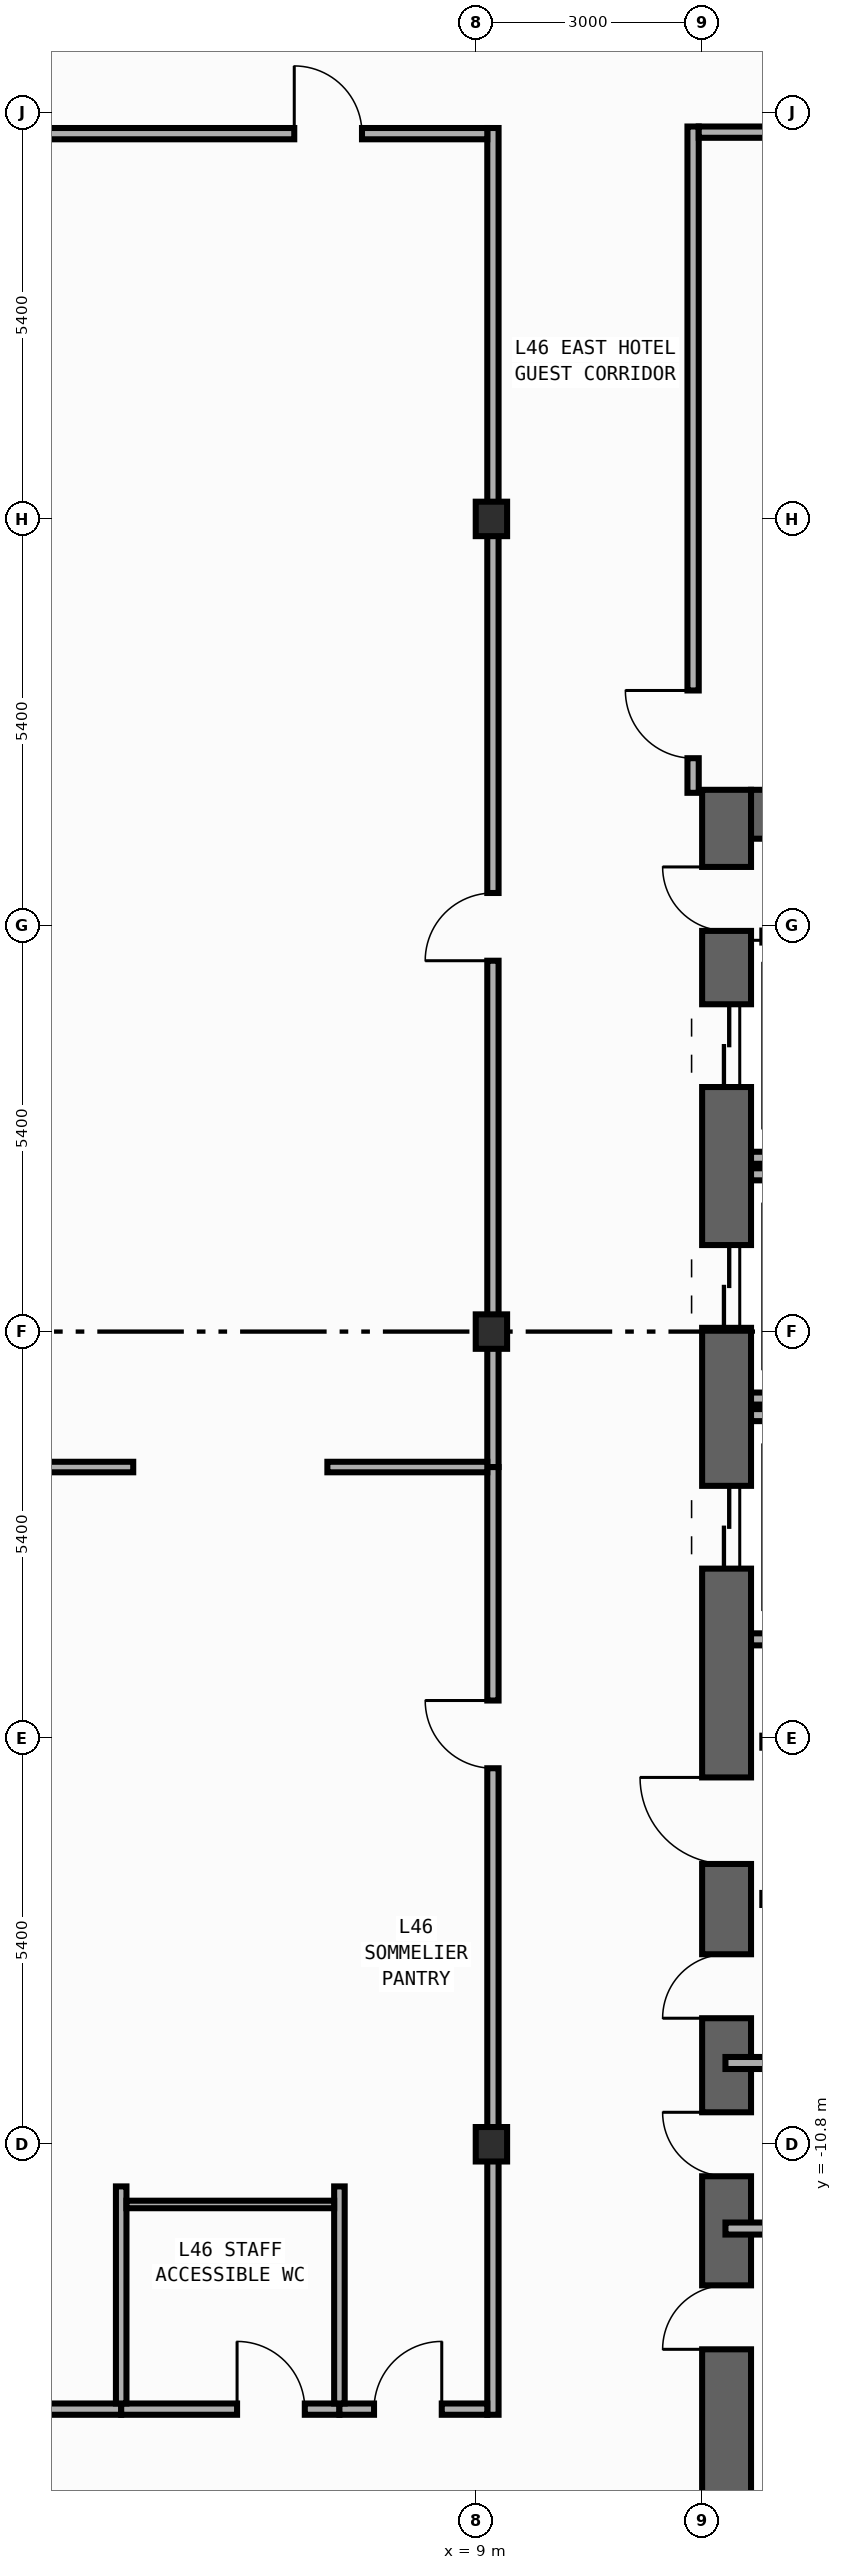
"""IFC4 building model, lengths in metres.
Left out: names, types, materials, properties, quantities, classifications, styles, units other than length and angle.
Written with IfcOpenShell. Run it as: python <this file> out.ifc"""

import sys

from ifc_helpers import new_model, si_unit, direction, frame, frame_2d, origin, origin_2d, place, context, subcontext, project, spatial, rectangle, i_section, extrude, element, fill, save


model = new_model("IFC4")
c1 = context("Model", 3, precision=1e-05, world=origin(), true_north=direction((0.0, 1.0)))
c2 = subcontext(c1, "Body", "Model", "MODEL_VIEW")
j1 = project(units=[si_unit("LENGTHUNIT", "METRE"), si_unit("PLANEANGLEUNIT", "RADIAN")], contexts=[c1])
p1 = place(None, origin())
s1 = spatial("IfcSite", under=j1, at=p1, CompositionType="ELEMENT")
p2 = place(p1, origin())
s2 = spatial("IfcBuilding", under=s1, at=p2, CompositionType="ELEMENT")
p3 = place(p2, frame((0.0, 0.0, 199.2)))
s3 = spatial("IfcBuildingStorey", under=s2, at=p3, CompositionType="ELEMENT", Elevation=199.2)
p4 = place(p3, frame((12.325, -19.8, 0.0), z_axis=(0.0, 0.0, 1.0), x_axis=(0.0, 1.0, 0.0)))
e1 = element("IfcWall", 1, at=p4, inside=s3, PredefinedType="SHEAR", context=c2, shape_type="SweptSolid", body=[
    extrude(rectangle(XDim=27.0, YDim=0.65, at=frame_2d((13.5, 0.0))), origin(), (0.0, 0.0, 1.0), 3.54),
])
p5 = place(p4, frame((23.05, 0.0, 0.0)))
e2 = element("IfcOpeningElement", 2, at=p5, cuts=e1, PredefinedType="OPENING", context=c2, shape_type="SweptSolid", body=[
    extrude(rectangle(XDim=1.1, YDim=2.2, at=frame_2d((0.55, 1.1))), frame((0.0, 0.335, 0.0), z_axis=(0.0, -1.0, 0.0), x_axis=(1.0, 0.0, 0.0)), (0.0, 0.0, 1.0), 0.67),
])
p6 = place(p4, frame((19.85, 0.0, 0.0)))
e3 = element("IfcOpeningElement", 3, at=p6, cuts=e1, PredefinedType="OPENING", context=c2, shape_type="SweptSolid", body=[
    extrude(rectangle(XDim=1.1, YDim=2.2, at=frame_2d((0.55, 1.1))), frame((0.0, 0.335, 0.0), z_axis=(0.0, -1.0, 0.0), x_axis=(1.0, 0.0, 0.0)), (0.0, 0.0, 1.0), 0.67),
])
p7 = place(p4, frame((16.65, 0.0, 0.0)))
e4 = element("IfcOpeningElement", 4, at=p7, cuts=e1, PredefinedType="OPENING", context=c2, shape_type="SweptSolid", body=[
    extrude(rectangle(XDim=1.1, YDim=2.2, at=frame_2d((0.55, 1.1))), frame((0.0, 0.335, 0.0), z_axis=(0.0, -1.0, 0.0), x_axis=(1.0, 0.0, 0.0)), (0.0, 0.0, 1.0), 0.67),
])
p8 = place(p4, frame((6.275, 0.0, 0.0)))
e5 = element("IfcOpeningElement", 5, at=p8, cuts=e1, PredefinedType="OPENING", context=c2, shape_type="SweptSolid", body=[
    extrude(rectangle(XDim=0.85, YDim=2.1, at=frame_2d((0.425, 1.05))), frame((0.0, 0.335, 0.0), z_axis=(0.0, -1.0, 0.0), x_axis=(1.0, 0.0, 0.0)), (0.0, 0.0, 1.0), 0.67),
])
p9 = place(p4, frame((8.575, 0.0, 0.0)))
e6 = element("IfcOpeningElement", 6, at=p9, cuts=e1, PredefinedType="OPENING", context=c2, shape_type="SweptSolid", body=[
    extrude(rectangle(XDim=0.85, YDim=2.1, at=frame_2d((0.425, 1.05))), frame((0.0, 0.335, 0.0), z_axis=(0.0, -1.0, 0.0), x_axis=(1.0, 0.0, 0.0)), (0.0, 0.0, 1.0), 0.67),
])
p10 = place(p4, frame((10.675, 0.0, 0.0)))
e7 = element("IfcOpeningElement", 7, at=p10, cuts=e1, PredefinedType="OPENING", context=c2, shape_type="SweptSolid", body=[
    extrude(rectangle(XDim=0.85, YDim=2.1, at=frame_2d((0.425, 1.05))), frame((0.0, 0.335, 0.0), z_axis=(0.0, -1.0, 0.0), x_axis=(1.0, 0.0, 0.0)), (0.0, 0.0, 1.0), 0.67),
])
p11 = place(p4, frame((12.725, 0.0, 0.0)))
e8 = element("IfcOpeningElement", 8, at=p11, cuts=e1, PredefinedType="OPENING", context=c2, shape_type="SweptSolid", body=[
    extrude(rectangle(XDim=1.15, YDim=2.2, at=frame_2d((0.575, 1.1))), frame((0.0, 0.335, 0.0), z_axis=(0.0, -1.0, 0.0), x_axis=(1.0, 0.0, 0.0)), (0.0, 0.0, 1.0), 0.67),
])
p12 = place(p4, frame((25.125, 0.0, 0.0)))
e9 = element("IfcOpeningElement", 9, at=p12, cuts=e1, PredefinedType="OPENING", context=c2, shape_type="SweptSolid", body=[
    extrude(rectangle(XDim=0.85, YDim=2.1, at=frame_2d((0.425, 1.05))), frame((0.0, 0.335, 0.0), z_axis=(0.0, -1.0, 0.0), x_axis=(1.0, 0.0, 0.0)), (0.0, 0.0, 1.0), 0.67),
])
p13 = place(p3, frame((12.65, 6.875, 0.0), z_axis=(0.0, 0.0, 1.0), x_axis=(1.0, 0.0, 0.0)))
e10 = element("IfcWall", 10, at=p13, inside=s3, PredefinedType="SHEAR", context=c2, shape_type="SweptSolid", body=[
    extrude(rectangle(XDim=7.1, YDim=0.65, at=frame_2d((3.55, 0.0))), origin(), (0.0, 0.0, 1.0), 3.54),
])
for number, where, z_axis, x_axis in (
    (11, (9.2, -10.8, 0.0), (0.0, 0.0, 1.0), (1.0, 0.0, 0.0)),
    (12, (9.2, 0.0, 0.0), (0.0, 0.0, 1.0), (1.0, 0.0, 0.0)),
    (13, (9.2, 10.8, 0.0), (0.0, 0.0, 1.0), (1.0, 0.0, 0.0)),
):
    element("IfcColumn", number, at=place(p3, frame(where, z_axis=z_axis, x_axis=x_axis)), inside=s3, PredefinedType="COLUMN", context=c2, shape_type="SweptSolid", body=[
        extrude(i_section(OverallWidth=0.417, OverallDepth=0.458, WebThickness=0.03, FlangeThickness=0.05, FilletRadius=0.022, at=origin_2d()), origin(), (0.0, 0.0, 1.0), 3.8),
    ])
for number, where, z_axis, x_axis in (
    (14, (12.65, 2.31, 0.0), (0.0, 0.0, 1.0), (1.0, 0.0, 0.0)),
    (15, (12.65, -0.89, 0.0), (0.0, 0.0, 1.0), (1.0, 0.0, 0.0)),
    (16, (12.65, 2.09, 0.0), (0.0, 0.0, 1.0), (1.0, 0.0, 0.0)),
    (17, (12.65, -4.09, 0.0), (0.0, 0.0, 1.0), (1.0, 0.0, 0.0)),
    (18, (12.65, -1.11, 0.0), (0.0, 0.0, 1.0), (1.0, 0.0, 0.0)),
):
    element("IfcWall", number, at=place(p3, frame(where, z_axis=z_axis, x_axis=x_axis)), inside=s3, PredefinedType="STANDARD", context=c2, shape_type="SweptSolid", body=[
        extrude(rectangle(XDim=2.34, YDim=0.16, at=frame_2d((1.17, 0.0))), origin(), (0.0, 0.0, 1.0), 3.54),
    ])
for number, where, z_axis, x_axis in (
    (19, (12.8, -5.45, 0.0), (0.0, 0.0, 1.0), (1.0, 0.0, 0.0)),
    (20, (12.8, -7.54, 0.0), (0.0, 0.0, 1.0), (1.0, 0.0, 0.0)),
    (21, (12.8, 5.25, 0.0), (0.0, 0.0, 1.0), (1.0, 0.0, 0.0)),
):
    element("IfcWall", number, at=place(p3, frame(where, z_axis=z_axis, x_axis=x_axis)), inside=s3, PredefinedType="STANDARD", context=c2, shape_type="SweptSolid", body=[
        extrude(rectangle(XDim=2.6, YDim=0.16, at=frame_2d((1.3, 0.0))), origin(), (0.0, 0.0, 1.0), 3.54),
    ])
for number, where, z_axis, x_axis in (
    (22, (12.31, -11.92, 0.0), (0.0, 0.0, 1.0), (1.0, 0.0, 0.0)),
    (23, (12.31, -9.72, 0.0), (0.0, 0.0, 1.0), (1.0, 0.0, 0.0)),
):
    element("IfcWall", number, at=place(p3, frame(where, z_axis=z_axis, x_axis=x_axis)), inside=s3, PredefinedType="PARTITIONING", context=c2, shape_type="SweptSolid", body=[
        extrude(rectangle(XDim=3.065, YDim=0.16, at=frame_2d((1.532, 0.0))), origin(), (0.0, 0.0, 1.0), 3.54),
    ])
p14 = place(p3, frame((9.22, -14.395, 0.0), z_axis=(0.0, 0.0, 1.0), x_axis=(0.0, 1.0, 0.0)))
e24 = element("IfcWall", 24, at=p14, inside=s3, PredefinedType="PARTITIONING", context=c2, shape_type="SweptSolid", body=[
    extrude(rectangle(XDim=12.595, YDim=0.15, at=frame_2d((6.297, 0.0))), origin(), (0.0, 0.0, 1.0), 2.952),
])
p15 = place(p14, frame((8.592, 0.0, 0.0)))
e25 = element("IfcOpeningElement", 25, at=p15, cuts=e24, PredefinedType="OPENING", context=c2, shape_type="SweptSolid", body=[
    extrude(rectangle(XDim=0.9, YDim=2.15, at=frame_2d((0.45, 1.075))), frame((0.0, 0.085, 0.0), z_axis=(0.0, -1.0, 0.0), x_axis=(1.0, 0.0, 0.0)), (0.0, 0.0, 1.0), 0.17),
])
p16 = place(p3, frame((9.22, -1.8, 0.0), z_axis=(0.0, 0.0, 1.0), x_axis=(0.0, 1.0, 0.0)))
e26 = element("IfcWall", 26, at=p16, inside=s3, PredefinedType="PARTITIONING", context=c2, shape_type="SweptSolid", body=[
    extrude(rectangle(XDim=17.795, YDim=0.15, at=frame_2d((8.897, 0.0))), origin(), (0.0, 0.0, 1.0), 2.952),
])
p17 = place(p16, frame((6.729, 0.0, 0.0)))
e27 = element("IfcOpeningElement", 27, at=p17, cuts=e26, PredefinedType="OPENING", context=c2, shape_type="SweptSolid", body=[
    extrude(rectangle(XDim=0.9, YDim=2.15, at=frame_2d((0.45, 1.075))), frame((0.0, 0.085, 0.0), z_axis=(0.0, -1.0, 0.0), x_axis=(1.0, 0.0, 0.0)), (0.0, 0.0, 1.0), 0.17),
])
p18 = place(p3, frame((11.88, 7.16, 0.0), z_axis=(0.0, 0.0, 1.0), x_axis=(0.0, 1.0, 0.0)))
e28 = element("IfcWall", 28, at=p18, inside=s3, PredefinedType="PARTITIONING", context=c2, shape_type="SweptSolid", body=[
    extrude(rectangle(XDim=8.855, YDim=0.15, at=frame_2d((4.427, 0.0))), origin(), (0.0, 0.0, 1.0), 3.54),
])
p19 = place(p18, frame((0.46, 0.0, 0.0)))
e29 = element("IfcOpeningElement", 29, at=p19, cuts=e28, PredefinedType="OPENING", context=c2, shape_type="SweptSolid", body=[
    extrude(rectangle(XDim=0.9, YDim=2.15, at=frame_2d((0.45, 1.075))), frame((0.0, 0.085, 0.0), z_axis=(0.0, -1.0, 0.0), x_axis=(1.0, 0.0, 0.0)), (0.0, 0.0, 1.0), 0.17),
])
p20 = place(p3, frame((-9.145, 15.92, 0.0), z_axis=(0.0, 0.0, 1.0), x_axis=(1.0, 0.0, 0.0)))
e30 = element("IfcWall", 30, at=p20, inside=s3, PredefinedType="PARTITIONING", context=c2, shape_type="SweptSolid", body=[
    extrude(rectangle(XDim=18.29, YDim=0.15, at=frame_2d((9.145, 0.0))), origin(), (0.0, 0.0, 1.0), 3.54),
])
p21 = place(p20, frame((15.725, 0.0, 0.0)))
e31 = element("IfcOpeningElement", 31, at=p21, cuts=e30, PredefinedType="OPENING", context=c2, shape_type="SweptSolid", body=[
    extrude(rectangle(XDim=0.9, YDim=2.15, at=frame_2d((0.45, 1.075))), frame((0.0, 0.085, 0.0), z_axis=(0.0, -1.0, 0.0), x_axis=(1.0, 0.0, 0.0)), (0.0, 0.0, 1.0), 0.17),
])
p22 = place(p3, frame((11.955, 15.94, 0.0), z_axis=(0.0, 0.0, 1.0), x_axis=(1.0, 0.0, 0.0)))
e32 = element("IfcWall", 32, at=p22, inside=s3, PredefinedType="PARTITIONING", context=c2, shape_type="SweptSolid", body=[
    extrude(rectangle(XDim=10.5, YDim=0.15, at=frame_2d((5.25, 0.0))), origin(), (0.0, 0.0, 1.0), 3.54),
])
p23 = place(p22, frame((4.901, 0.0, 0.0)))
e33 = element("IfcOpeningElement", 33, at=p23, cuts=e32, PredefinedType="OPENING", context=c2, shape_type="SweptSolid", body=[
    extrude(rectangle(XDim=0.9, YDim=2.15, at=frame_2d((0.45, 1.075))), frame((0.0, 0.085, 0.0), z_axis=(0.0, -1.0, 0.0), x_axis=(1.0, 0.0, 0.0)), (0.0, 0.0, 1.0), 0.17),
])
p24 = place(p3, frame((-3.32, -14.32, 0.0), z_axis=(0.0, 0.0, 1.0), x_axis=(1.0, 0.0, 0.0)))
e34 = element("IfcWall", 34, at=p24, inside=s3, PredefinedType="PARTITIONING", context=c2, shape_type="SweptSolid", body=[
    extrude(rectangle(XDim=7.6, YDim=0.15, at=frame_2d((3.8, 0.0))), origin(), (0.0, 0.0, 1.0), 3.54),
])
p25 = place(p24, frame((0.667, 0.0, 0.0)))
e35 = element("IfcOpeningElement", 35, at=p25, cuts=e34, PredefinedType="OPENING", context=c2, shape_type="SweptSolid", body=[
    extrude(rectangle(XDim=0.9, YDim=2.15, at=frame_2d((0.45, 1.075))), frame((0.0, 0.085, 0.0), z_axis=(0.0, -1.0, 0.0), x_axis=(1.0, 0.0, 0.0)), (0.0, 0.0, 1.0), 0.17),
])
p26 = place(p3, frame((4.28, -14.32, 0.0), z_axis=(0.0, 0.0, 1.0), x_axis=(1.0, 0.0, 0.0)))
e36 = element("IfcWall", 36, at=p26, inside=s3, PredefinedType="PARTITIONING", context=c2, shape_type="SweptSolid", body=[
    extrude(rectangle(XDim=2.9, YDim=0.15, at=frame_2d((1.45, 0.0))), origin(), (0.0, 0.0, 1.0), 3.54),
])
p27 = place(p26, frame((1.54, 0.0, 0.0)))
e37 = element("IfcOpeningElement", 37, at=p27, cuts=e36, PredefinedType="OPENING", context=c2, shape_type="SweptSolid", body=[
    extrude(rectangle(XDim=0.9, YDim=2.15, at=frame_2d((0.45, 1.075))), frame((0.0, 0.085, 0.0), z_axis=(0.0, -1.0, 0.0), x_axis=(1.0, 0.0, 0.0)), (0.0, 0.0, 1.0), 0.17),
])
p28 = place(p3, frame((7.18, -14.32, 0.0), z_axis=(0.0, 0.0, 1.0), x_axis=(1.0, 0.0, 0.0)))
e38 = element("IfcWall", 38, at=p28, inside=s3, PredefinedType="PARTITIONING", context=c2, shape_type="SweptSolid", body=[
    extrude(rectangle(XDim=1.965, YDim=0.15, at=frame_2d((0.982, 0.0))), origin(), (0.0, 0.0, 1.0), 3.54),
])
p29 = place(p28, frame((0.46, 0.0, 0.0)))
e39 = element("IfcOpeningElement", 39, at=p29, cuts=e38, PredefinedType="OPENING", context=c2, shape_type="SweptSolid", body=[
    extrude(rectangle(XDim=0.9, YDim=2.15, at=frame_2d((0.45, 1.075))), frame((0.0, 0.085, 0.0), z_axis=(0.0, -1.0, 0.0), x_axis=(1.0, 0.0, 0.0)), (0.0, 0.0, 1.0), 0.17),
])
p30 = place(p3, frame((4.28, -14.245, 0.0), z_axis=(0.0, 0.0, 1.0), x_axis=(0.0, 1.0, 0.0)))
e40 = element("IfcWall", 40, at=p30, inside=s3, PredefinedType="PARTITIONING", context=c2, shape_type="SweptSolid", body=[
    extrude(rectangle(XDim=2.885, YDim=0.14, at=frame_2d((1.442, 0.0))), origin(), (0.0, 0.0, 1.0), 3.54),
])
p31 = place(p3, frame((-3.32, -1.8, 0.0), z_axis=(0.0, 0.0, 1.0), x_axis=(1.0, 0.0, 0.0)))
e41 = element("IfcWall", 41, at=p31, inside=s3, PredefinedType="PARTITIONING", context=c2, shape_type="SweptSolid", body=[
    extrude(rectangle(XDim=7.76, YDim=0.14, at=frame_2d((3.88, 0.0))), origin(), (0.0, 0.0, 1.0), 3.54),
])
p32 = place(p3, frame((7.18, -14.245, 0.0), z_axis=(0.0, 0.0, 1.0), x_axis=(0.0, 1.0, 0.0)))
e42 = element("IfcWall", 42, at=p32, inside=s3, PredefinedType="PARTITIONING", context=c2, shape_type="SweptSolid", body=[
    extrude(rectangle(XDim=2.885, YDim=0.14, at=frame_2d((1.442, 0.0))), origin(), (0.0, 0.0, 1.0), 3.54),
])
p33 = place(p3, frame((7.02, -1.8, 0.0), z_axis=(0.0, 0.0, 1.0), x_axis=(1.0, 0.0, 0.0)))
e43 = element("IfcWall", 43, at=p33, inside=s3, PredefinedType="PARTITIONING", context=c2, shape_type="SweptSolid", body=[
    extrude(rectangle(XDim=2.125, YDim=0.14, at=frame_2d((1.062, 0.0))), origin(), (0.0, 0.0, 1.0), 3.54),
])
p34 = place(p3, frame((4.35, -11.6, 0.0), z_axis=(0.0, 0.0, 1.0), x_axis=(1.0, 0.0, 0.0)))
e44 = element("IfcWall", 44, at=p34, inside=s3, PredefinedType="PARTITIONING", context=c2, shape_type="SweptSolid", body=[
    extrude(rectangle(XDim=2.76, YDim=0.1, at=frame_2d((1.38, 0.0))), origin(), (0.0, 0.0, 1.0), 3.54),
])
p35 = place(p5, origin())
e45 = element("IfcDoor", 45, at=p35, inside=s3, OperationType="DOUBLE_DOOR_SLIDING", PredefinedType="DOOR", context=c2, shape_type="SweptSolid", body=[
    extrude(rectangle(XDim=1.1, YDim=2.2, at=frame_2d((0.55, 1.1))), frame((0.0, 0.025, 0.0), z_axis=(0.0, -1.0, 0.0), x_axis=(1.0, 0.0, 0.0)), (0.0, 0.0, 1.0), 0.05),
])
fill(e2, e45)
p36 = place(p6, origin())
e46 = element("IfcDoor", 46, at=p36, inside=s3, OperationType="DOUBLE_DOOR_SLIDING", PredefinedType="DOOR", context=c2, shape_type="SweptSolid", body=[
    extrude(rectangle(XDim=1.1, YDim=2.2, at=frame_2d((0.55, 1.1))), frame((0.0, 0.025, 0.0), z_axis=(0.0, -1.0, 0.0), x_axis=(1.0, 0.0, 0.0)), (0.0, 0.0, 1.0), 0.05),
])
fill(e3, e46)
p37 = place(p7, origin())
e47 = element("IfcDoor", 47, at=p37, inside=s3, OperationType="DOUBLE_DOOR_SLIDING", PredefinedType="DOOR", context=c2, shape_type="SweptSolid", body=[
    extrude(rectangle(XDim=1.1, YDim=2.2, at=frame_2d((0.55, 1.1))), frame((0.0, 0.025, 0.0), z_axis=(0.0, -1.0, 0.0), x_axis=(1.0, 0.0, 0.0)), (0.0, 0.0, 1.0), 0.05),
])
fill(e4, e47)
p38 = place(p8, origin())
e48 = element("IfcDoor", 48, at=p38, inside=s3, OperationType="SINGLE_SWING_LEFT", PredefinedType="DOOR", context=c2, shape_type="SweptSolid", body=[
    extrude(rectangle(XDim=0.85, YDim=2.1, at=frame_2d((0.425, 1.05))), frame((0.0, 0.025, 0.0), z_axis=(0.0, -1.0, 0.0), x_axis=(1.0, 0.0, 0.0)), (0.0, 0.0, 1.0), 0.05),
])
fill(e5, e48)
p39 = place(p9, origin())
e49 = element("IfcDoor", 49, at=p39, inside=s3, OperationType="SINGLE_SWING_RIGHT", PredefinedType="DOOR", context=c2, shape_type="SweptSolid", body=[
    extrude(rectangle(XDim=0.85, YDim=2.1, at=frame_2d((0.425, 1.05))), frame((0.0, 0.025, 0.0), z_axis=(0.0, -1.0, 0.0), x_axis=(1.0, 0.0, 0.0)), (0.0, 0.0, 1.0), 0.05),
])
fill(e6, e49)
p40 = place(p10, origin())
e50 = element("IfcDoor", 50, at=p40, inside=s3, OperationType="SINGLE_SWING_LEFT", PredefinedType="DOOR", context=c2, shape_type="SweptSolid", body=[
    extrude(rectangle(XDim=0.85, YDim=2.1, at=frame_2d((0.425, 1.05))), frame((0.0, 0.025, 0.0), z_axis=(0.0, -1.0, 0.0), x_axis=(1.0, 0.0, 0.0)), (0.0, 0.0, 1.0), 0.05),
])
fill(e7, e50)
p41 = place(p11, origin())
e51 = element("IfcDoor", 51, at=p41, inside=s3, OperationType="SINGLE_SWING_RIGHT", PredefinedType="DOOR", context=c2, shape_type="SweptSolid", body=[
    extrude(rectangle(XDim=1.15, YDim=2.2, at=frame_2d((0.575, 1.1))), frame((0.0, 0.025, 0.0), z_axis=(0.0, -1.0, 0.0), x_axis=(1.0, 0.0, 0.0)), (0.0, 0.0, 1.0), 0.05),
])
fill(e8, e51)
p42 = place(p12, origin())
e52 = element("IfcDoor", 52, at=p42, inside=s3, OperationType="SINGLE_SWING_RIGHT", PredefinedType="DOOR", context=c2, shape_type="SweptSolid", body=[
    extrude(rectangle(XDim=0.85, YDim=2.1, at=frame_2d((0.425, 1.05))), frame((0.0, 0.025, 0.0), z_axis=(0.0, -1.0, 0.0), x_axis=(1.0, 0.0, 0.0)), (0.0, 0.0, 1.0), 0.05),
])
fill(e9, e52)
p43 = place(p15, origin())
e53 = element("IfcDoor", 53, at=p43, inside=s3, OperationType="SINGLE_SWING_RIGHT", PredefinedType="DOOR", context=c2, shape_type="SweptSolid", body=[
    extrude(rectangle(XDim=0.9, YDim=2.15, at=frame_2d((0.45, 1.075))), frame((0.0, 0.025, 0.0), z_axis=(0.0, -1.0, 0.0), x_axis=(1.0, 0.0, 0.0)), (0.0, 0.0, 1.0), 0.05),
])
fill(e25, e53)
p44 = place(p17, origin())
e54 = element("IfcDoor", 54, at=p44, inside=s3, OperationType="SINGLE_SWING_LEFT", PredefinedType="DOOR", context=c2, shape_type="SweptSolid", body=[
    extrude(rectangle(XDim=0.9, YDim=2.15, at=frame_2d((0.45, 1.075))), frame((0.0, 0.025, 0.0), z_axis=(0.0, -1.0, 0.0), x_axis=(1.0, 0.0, 0.0)), (0.0, 0.0, 1.0), 0.05),
])
fill(e27, e54)
p45 = place(p19, origin())
e55 = element("IfcDoor", 55, at=p45, inside=s3, OperationType="SINGLE_SWING_RIGHT", PredefinedType="DOOR", context=c2, shape_type="SweptSolid", body=[
    extrude(rectangle(XDim=0.9, YDim=2.15, at=frame_2d((0.45, 1.075))), frame((0.0, 0.025, 0.0), z_axis=(0.0, -1.0, 0.0), x_axis=(1.0, 0.0, 0.0)), (0.0, 0.0, 1.0), 0.05),
])
fill(e29, e55)
p46 = place(p21, origin())
e56 = element("IfcDoor", 56, at=p46, inside=s3, OperationType="SINGLE_SWING_LEFT", PredefinedType="DOOR", context=c2, shape_type="SweptSolid", body=[
    extrude(rectangle(XDim=0.9, YDim=2.15, at=frame_2d((0.45, 1.075))), frame((0.0, 0.025, 0.0), z_axis=(0.0, -1.0, 0.0), x_axis=(1.0, 0.0, 0.0)), (0.0, 0.0, 1.0), 0.05),
])
fill(e31, e56)
p47 = place(p27, origin())
e57 = element("IfcDoor", 57, at=p47, inside=s3, OperationType="SINGLE_SWING_LEFT", PredefinedType="DOOR", context=c2, shape_type="SweptSolid", body=[
    extrude(rectangle(XDim=0.9, YDim=2.15, at=frame_2d((0.45, 1.075))), frame((0.0, 0.025, 0.0), z_axis=(0.0, -1.0, 0.0), x_axis=(1.0, 0.0, 0.0)), (0.0, 0.0, 1.0), 0.05),
])
fill(e37, e57)
p48 = place(p29, origin())
e58 = element("IfcDoor", 58, at=p48, inside=s3, OperationType="SINGLE_SWING_RIGHT", PredefinedType="DOOR", context=c2, shape_type="SweptSolid", body=[
    extrude(rectangle(XDim=0.9, YDim=2.15, at=frame_2d((0.45, 1.075))), frame((0.0, 0.025, 0.0), z_axis=(0.0, -1.0, 0.0), x_axis=(1.0, 0.0, 0.0)), (0.0, 0.0, 1.0), 0.05),
])
fill(e39, e58)
save(model, sys.argv[1])
